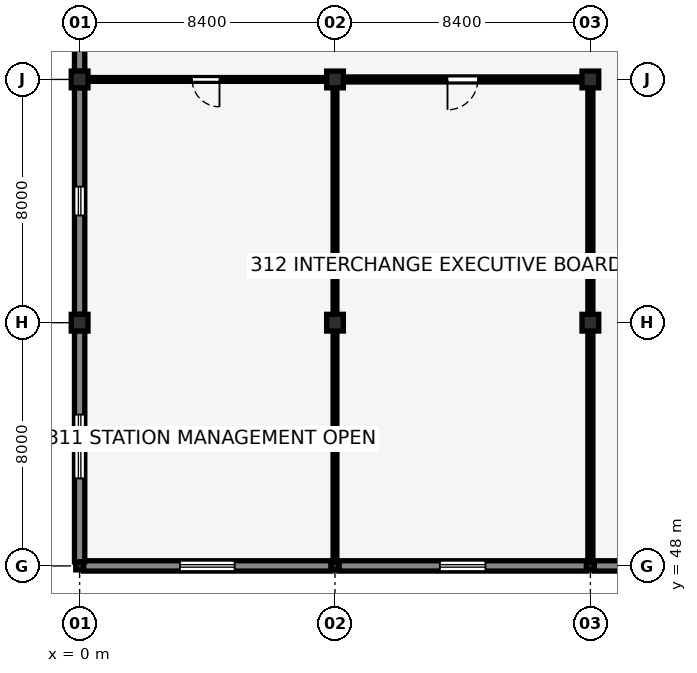
"""IFC4 building model, lengths in metres.
Left out: names, types, materials, properties, quantities, classifications, styles, units other than length and angle.
Written with IfcOpenShell. Run it as: python <this file> out.ifc"""

import sys

from ifc_helpers import new_model, si_unit, direction, frame, frame_2d, origin, origin_2d, place, context, subcontext, project, spatial, rectangle, i_section, extrude, element, fill, save


model = new_model("IFC4")
c1 = context("Model", 3, precision=1e-05, world=origin(), true_north=direction((0.0, 1.0)))
c2 = subcontext(c1, "Body", "Model", "MODEL_VIEW")
j1 = project(units=[si_unit("LENGTHUNIT", "METRE"), si_unit("PLANEANGLEUNIT", "RADIAN")], contexts=[c1])
p1 = place(None, origin())
s1 = spatial("IfcSite", under=j1, at=p1, CompositionType="ELEMENT")
p2 = place(p1, origin())
s2 = spatial("IfcBuilding", under=s1, at=p2, CompositionType="ELEMENT")
p3 = place(p2, frame((0.0, 0.0, 13.36)))
s3 = spatial("IfcBuildingStorey", under=s2, at=p3, CompositionType="ELEMENT", Elevation=13.36)
p4 = place(p3, frame((0.0, 48.0, 0.0), z_axis=(0.0, 0.0, 1.0), x_axis=(1.0, 0.0, 0.0)))
e1 = element("IfcColumn", 1, at=p4, inside=s3, PredefinedType="COLUMN", context=c2, shape_type="SweptSolid", body=[
    extrude(i_section(OverallWidth=0.256, OverallDepth=0.26, WebThickness=0.01, FlangeThickness=0.017, FilletRadius=0.013, at=origin_2d()), origin(), (0.0, 0.0, 1.0), 3.58),
])
for number, where, z_axis, x_axis in (
    (2, (0.0, 56.0, 0.0), (0.0, 0.0, 1.0), (1.0, 0.0, 0.0)),
    (3, (0.0, 64.0, 0.0), (0.0, 0.0, 1.0), (1.0, 0.0, 0.0)),
):
    element("IfcColumn", number, at=place(p3, frame(where, z_axis=z_axis, x_axis=x_axis)), inside=s3, PredefinedType="COLUMN", context=c2, shape_type="SweptSolid", body=[
        extrude(rectangle(XDim=0.55, YDim=0.55, at=origin_2d()), origin(), (0.0, 0.0, 1.0), 3.58),
    ])
p5 = place(p3, frame((8.4, 48.0, 0.0), z_axis=(0.0, 0.0, 1.0), x_axis=(1.0, 0.0, 0.0)))
e4 = element("IfcColumn", 4, at=p5, inside=s3, PredefinedType="COLUMN", context=c2, shape_type="SweptSolid", body=[
    extrude(i_section(OverallWidth=0.256, OverallDepth=0.26, WebThickness=0.01, FlangeThickness=0.017, FilletRadius=0.013, at=origin_2d()), origin(), (0.0, 0.0, 1.0), 3.58),
])
for number, where, z_axis, x_axis in (
    (5, (8.4, 56.0, 0.0), (0.0, 0.0, 1.0), (1.0, 0.0, 0.0)),
    (6, (8.4, 64.0, 0.0), (0.0, 0.0, 1.0), (1.0, 0.0, 0.0)),
):
    element("IfcColumn", number, at=place(p3, frame(where, z_axis=z_axis, x_axis=x_axis)), inside=s3, PredefinedType="COLUMN", context=c2, shape_type="SweptSolid", body=[
        extrude(rectangle(XDim=0.55, YDim=0.55, at=origin_2d()), origin(), (0.0, 0.0, 1.0), 3.58),
    ])
p6 = place(p3, frame((16.8, 48.0, 0.0), z_axis=(0.0, 0.0, 1.0), x_axis=(1.0, 0.0, 0.0)))
e7 = element("IfcColumn", 7, at=p6, inside=s3, PredefinedType="COLUMN", context=c2, shape_type="SweptSolid", body=[
    extrude(i_section(OverallWidth=0.256, OverallDepth=0.26, WebThickness=0.01, FlangeThickness=0.017, FilletRadius=0.013, at=origin_2d()), origin(), (0.0, 0.0, 1.0), 3.58),
])
for number, where, z_axis, x_axis in (
    (8, (16.8, 56.0, 0.0), (0.0, 0.0, 1.0), (1.0, 0.0, 0.0)),
    (9, (16.8, 64.0, 0.0), (0.0, 0.0, 1.0), (1.0, 0.0, 0.0)),
):
    element("IfcColumn", number, at=place(p3, frame(where, z_axis=z_axis, x_axis=x_axis)), inside=s3, PredefinedType="COLUMN", context=c2, shape_type="SweptSolid", body=[
        extrude(rectangle(XDim=0.55, YDim=0.55, at=origin_2d()), origin(), (0.0, 0.0, 1.0), 3.58),
    ])
p7 = place(p3, frame((0.128, 48.0, 0.0), z_axis=(0.0, 0.0, 1.0), x_axis=(1.0, 0.0, 0.0)))
e10 = element("IfcWall", 10, at=p7, inside=s3, PredefinedType="SOLIDWALL", context=c2, shape_type="SweptSolid", body=[
    extrude(rectangle(XDim=8.144, YDim=0.34, at=frame_2d((4.072, 0.0))), origin(), (0.0, 0.0, 1.0), 3.28),
])
p8 = place(p7, frame((3.172, 0.0, 0.9), z_axis=(0.0, 0.0, 1.0), x_axis=(1.0, 0.0, 0.0)))
e11 = element("IfcOpeningElement", 11, at=p8, cuts=e10, PredefinedType="OPENING", context=c2, shape_type="SweptSolid", body=[
    extrude(rectangle(XDim=1.8, YDim=1.3, at=frame_2d((0.9, 0.65))), frame((0.0, 0.18, 0.0), z_axis=(0.0, -1.0, 0.0), x_axis=(1.0, 0.0, 0.0)), (0.0, 0.0, 1.0), 0.36),
])
p9 = place(p3, frame((8.528, 48.0, 0.0), z_axis=(0.0, 0.0, 1.0), x_axis=(1.0, 0.0, 0.0)))
e12 = element("IfcWall", 12, at=p9, inside=s3, PredefinedType="SOLIDWALL", context=c2, shape_type="SweptSolid", body=[
    extrude(rectangle(XDim=8.144, YDim=0.34, at=frame_2d((4.072, 0.0))), origin(), (0.0, 0.0, 1.0), 3.28),
])
p10 = place(p9, frame((3.322, 0.0, 0.9), z_axis=(0.0, 0.0, 1.0), x_axis=(1.0, 0.0, 0.0)))
e13 = element("IfcOpeningElement", 13, at=p10, cuts=e12, PredefinedType="OPENING", context=c2, shape_type="SweptSolid", body=[
    extrude(rectangle(XDim=1.5, YDim=1.4, at=frame_2d((0.75, 0.7))), frame((0.0, 0.18, 0.0), z_axis=(0.0, -1.0, 0.0), x_axis=(1.0, 0.0, 0.0)), (0.0, 0.0, 1.0), 0.36),
])
p11 = place(p3, frame((16.928, 48.0, 0.0), z_axis=(0.0, 0.0, 1.0), x_axis=(1.0, 0.0, 0.0)))
e14 = element("IfcWall", 14, at=p11, inside=s3, PredefinedType="SOLIDWALL", context=c2, shape_type="SweptSolid", body=[
    extrude(rectangle(XDim=8.144, YDim=0.34, at=frame_2d((4.072, 0.0))), origin(), (0.0, 0.0, 1.0), 3.28),
])
p12 = place(p11, frame((2.472, 0.0, 1.55), z_axis=(0.0, 0.0, 1.0), x_axis=(1.0, 0.0, 0.0)))
e15 = element("IfcOpeningElement", 15, at=p12, cuts=e14, PredefinedType="OPENING", context=c2, shape_type="SweptSolid", body=[
    extrude(rectangle(XDim=3.2, YDim=0.9, at=frame_2d((1.6, 0.45))), frame((0.0, 0.18, 0.0), z_axis=(0.0, -1.0, 0.0), x_axis=(1.0, 0.0, 0.0)), (0.0, 0.0, 1.0), 0.36),
])
p13 = place(p3, frame((0.0, 48.13, 0.0), z_axis=(0.0, 0.0, 1.0), x_axis=(0.0, 1.0, 0.0)))
e16 = element("IfcWall", 16, at=p13, inside=s3, PredefinedType="SOLIDWALL", context=c2, shape_type="SweptSolid", body=[
    extrude(rectangle(XDim=7.595, YDim=0.34, at=frame_2d((3.797, 0.0))), origin(), (0.0, 0.0, 1.0), 3.28),
])
p14 = place(p13, frame((2.748, 0.0, 1.55), z_axis=(0.0, 0.0, 1.0), x_axis=(1.0, 0.0, 0.0)))
e17 = element("IfcOpeningElement", 17, at=p14, cuts=e16, PredefinedType="OPENING", context=c2, shape_type="SweptSolid", body=[
    extrude(rectangle(XDim=2.1, YDim=0.8, at=frame_2d((1.05, 0.4))), frame((0.0, 0.18, 0.0), z_axis=(0.0, -1.0, 0.0), x_axis=(1.0, 0.0, 0.0)), (0.0, 0.0, 1.0), 0.36),
])
p15 = place(p3, frame((0.0, 56.275, 0.0), z_axis=(0.0, 0.0, 1.0), x_axis=(0.0, 1.0, 0.0)))
e18 = element("IfcWall", 18, at=p15, inside=s3, PredefinedType="SOLIDWALL", context=c2, shape_type="SweptSolid", body=[
    extrude(rectangle(XDim=7.45, YDim=0.34, at=frame_2d((3.725, 0.0))), origin(), (0.0, 0.0, 1.0), 3.28),
])
p16 = place(p15, frame((3.25, 0.0, 0.65), z_axis=(0.0, 0.0, 1.0), x_axis=(1.0, 0.0, 0.0)))
e19 = element("IfcOpeningElement", 19, at=p16, cuts=e18, PredefinedType="OPENING", context=c2, shape_type="SweptSolid", body=[
    extrude(rectangle(XDim=0.95, YDim=2.1, at=frame_2d((0.475, 1.05))), frame((0.0, 0.18, 0.0), z_axis=(0.0, -1.0, 0.0), x_axis=(1.0, 0.0, 0.0)), (0.0, 0.0, 1.0), 0.36),
])
p17 = place(p3, frame((0.0, 64.275, 0.0), z_axis=(0.0, 0.0, 1.0), x_axis=(0.0, 1.0, 0.0)))
e20 = element("IfcWall", 20, at=p17, inside=s3, PredefinedType="SOLIDWALL", context=c2, shape_type="SweptSolid", body=[
    extrude(rectangle(XDim=7.45, YDim=0.34, at=frame_2d((3.725, 0.0))), origin(), (0.0, 0.0, 1.0), 3.28),
])
p18 = place(p3, frame((0.265, 64.0, 0.0), z_axis=(0.0, 0.0, 1.0), x_axis=(1.0, 0.0, 0.0)))
e21 = element("IfcWall", 21, at=p18, inside=s3, PredefinedType="PARTITIONING", context=c2, shape_type="SweptSolid", body=[
    extrude(rectangle(XDim=7.87, YDim=0.125, at=frame_2d((3.935, 0.0))), origin(), (0.0, 0.0, 1.0), 3.123),
])
p19 = place(p18, frame((4.335, 0.0, 0.0), z_axis=(0.0, 0.0, 1.0), x_axis=(-1.0, 0.0, 0.0)))
e22 = element("IfcOpeningElement", 22, at=p19, cuts=e21, PredefinedType="OPENING", context=c2, shape_type="SweptSolid", body=[
    extrude(rectangle(XDim=0.9, YDim=2.1, at=frame_2d((0.45, 1.05))), frame((0.0, 0.073, 0.0), z_axis=(0.0, -1.0, 0.0), x_axis=(1.0, 0.0, 0.0)), (0.0, 0.0, 1.0), 0.145),
])
p20 = place(p3, frame((8.665, 64.0, 0.0), z_axis=(0.0, 0.0, 1.0), x_axis=(1.0, 0.0, 0.0)))
e23 = element("IfcWall", 23, at=p20, inside=s3, PredefinedType="PARTITIONING", context=c2, shape_type="SweptSolid", body=[
    extrude(rectangle(XDim=7.87, YDim=0.165, at=frame_2d((3.935, 0.0))), origin(), (0.0, 0.0, 1.0), 3.123),
])
p21 = place(p20, frame((4.435, 0.0, 0.0), z_axis=(0.0, 0.0, 1.0), x_axis=(-1.0, 0.0, 0.0)))
e24 = element("IfcOpeningElement", 24, at=p21, cuts=e23, PredefinedType="OPENING", context=c2, shape_type="SweptSolid", body=[
    extrude(rectangle(XDim=1.0, YDim=2.15, at=frame_2d((0.5, 1.075))), frame((0.0, 0.093, 0.0), z_axis=(0.0, -1.0, 0.0), x_axis=(1.0, 0.0, 0.0)), (0.0, 0.0, 1.0), 0.185),
])
p22 = place(p3, frame((8.4, 48.12, 0.0), z_axis=(0.0, 0.0, 1.0), x_axis=(0.0, 1.0, 0.0)))
e25 = element("IfcWall", 25, at=p22, inside=s3, PredefinedType="PARTITIONING", context=c2, shape_type="SweptSolid", body=[
    extrude(rectangle(XDim=7.615, YDim=0.125, at=frame_2d((3.808, 0.0))), origin(), (0.0, 0.0, 1.0), 3.126),
])
p23 = place(p3, frame((8.4, 56.265, 0.0), z_axis=(0.0, 0.0, 1.0), x_axis=(0.0, 1.0, 0.0)))
e26 = element("IfcWall", 26, at=p23, inside=s3, PredefinedType="PARTITIONING", context=c2, shape_type="SweptSolid", body=[
    extrude(rectangle(XDim=7.47, YDim=0.125, at=frame_2d((3.735, 0.0))), origin(), (0.0, 0.0, 1.0), 3.126),
])
p24 = place(p3, frame((16.8, 48.12, 0.0), z_axis=(0.0, 0.0, 1.0), x_axis=(0.0, 1.0, 0.0)))
e27 = element("IfcWall", 27, at=p24, inside=s3, PredefinedType="PARTITIONING", context=c2, shape_type="SweptSolid", body=[
    extrude(rectangle(XDim=7.615, YDim=0.165, at=frame_2d((3.808, 0.0))), origin(), (0.0, 0.0, 1.0), 3.126),
])
p25 = place(p3, frame((16.8, 56.265, 0.0), z_axis=(0.0, 0.0, 1.0), x_axis=(0.0, 1.0, 0.0)))
e28 = element("IfcWall", 28, at=p25, inside=s3, PredefinedType="PARTITIONING", context=c2, shape_type="SweptSolid", body=[
    extrude(rectangle(XDim=7.47, YDim=0.165, at=frame_2d((3.735, 0.0))), origin(), (0.0, 0.0, 1.0), 3.126),
])
p26 = place(p8, origin())
e29 = element("IfcWindow", 29, at=p26, inside=s3, PartitioningType="DOUBLE_PANEL_VERTICAL", PredefinedType="WINDOW", context=c2, shape_type="SweptSolid", body=[
    extrude(rectangle(XDim=1.8, YDim=1.3, at=frame_2d((0.9, 0.65))), frame((0.0, 0.03, 0.0), z_axis=(0.0, -1.0, 0.0), x_axis=(1.0, 0.0, 0.0)), (0.0, 0.0, 1.0), 0.06),
])
fill(e11, e29)
p27 = place(p10, origin())
e30 = element("IfcWindow", 30, at=p27, inside=s3, PartitioningType="SINGLE_PANEL", PredefinedType="WINDOW", context=c2, shape_type="SweptSolid", body=[
    extrude(rectangle(XDim=1.5, YDim=1.4, at=frame_2d((0.75, 0.7))), frame((0.0, 0.03, 0.0), z_axis=(0.0, -1.0, 0.0), x_axis=(1.0, 0.0, 0.0)), (0.0, 0.0, 1.0), 0.06),
])
fill(e13, e30)
p28 = place(p14, origin())
e31 = element("IfcWindow", 31, at=p28, inside=s3, PartitioningType="DOUBLE_PANEL_HORIZONTAL", PredefinedType="WINDOW", context=c2, shape_type="SweptSolid", body=[
    extrude(rectangle(XDim=2.1, YDim=0.8, at=frame_2d((1.05, 0.4))), frame((0.0, 0.03, 0.0), z_axis=(0.0, -1.0, 0.0), x_axis=(1.0, 0.0, 0.0)), (0.0, 0.0, 1.0), 0.06),
])
fill(e17, e31)
p29 = place(p16, origin())
e32 = element("IfcWindow", 32, at=p29, inside=s3, PartitioningType="SINGLE_PANEL", PredefinedType="WINDOW", context=c2, shape_type="SweptSolid", body=[
    extrude(rectangle(XDim=0.95, YDim=2.1, at=frame_2d((0.475, 1.05))), frame((0.0, 0.03, 0.0), z_axis=(0.0, -1.0, 0.0), x_axis=(1.0, 0.0, 0.0)), (0.0, 0.0, 1.0), 0.06),
])
fill(e19, e32)
p30 = place(p19, origin())
e33 = element("IfcDoor", 33, at=p30, inside=s3, OperationType="SINGLE_SWING_LEFT", PredefinedType="DOOR", context=c2, shape_type="SweptSolid", body=[
    extrude(rectangle(XDim=0.9, YDim=2.1, at=frame_2d((0.45, 1.05))), frame((0.0, 0.025, 0.0), z_axis=(0.0, -1.0, 0.0), x_axis=(1.0, 0.0, 0.0)), (0.0, 0.0, 1.0), 0.05),
])
fill(e22, e33)
p31 = place(p21, origin())
e34 = element("IfcDoor", 34, at=p31, inside=s3, OperationType="SINGLE_SWING_RIGHT", PredefinedType="DOOR", context=c2, shape_type="SweptSolid", body=[
    extrude(rectangle(XDim=1.0, YDim=2.15, at=frame_2d((0.5, 1.075))), frame((0.0, 0.025, 0.0), z_axis=(0.0, -1.0, 0.0), x_axis=(1.0, 0.0, 0.0)), (0.0, 0.0, 1.0), 0.05),
])
fill(e24, e34)
save(model, sys.argv[1])
